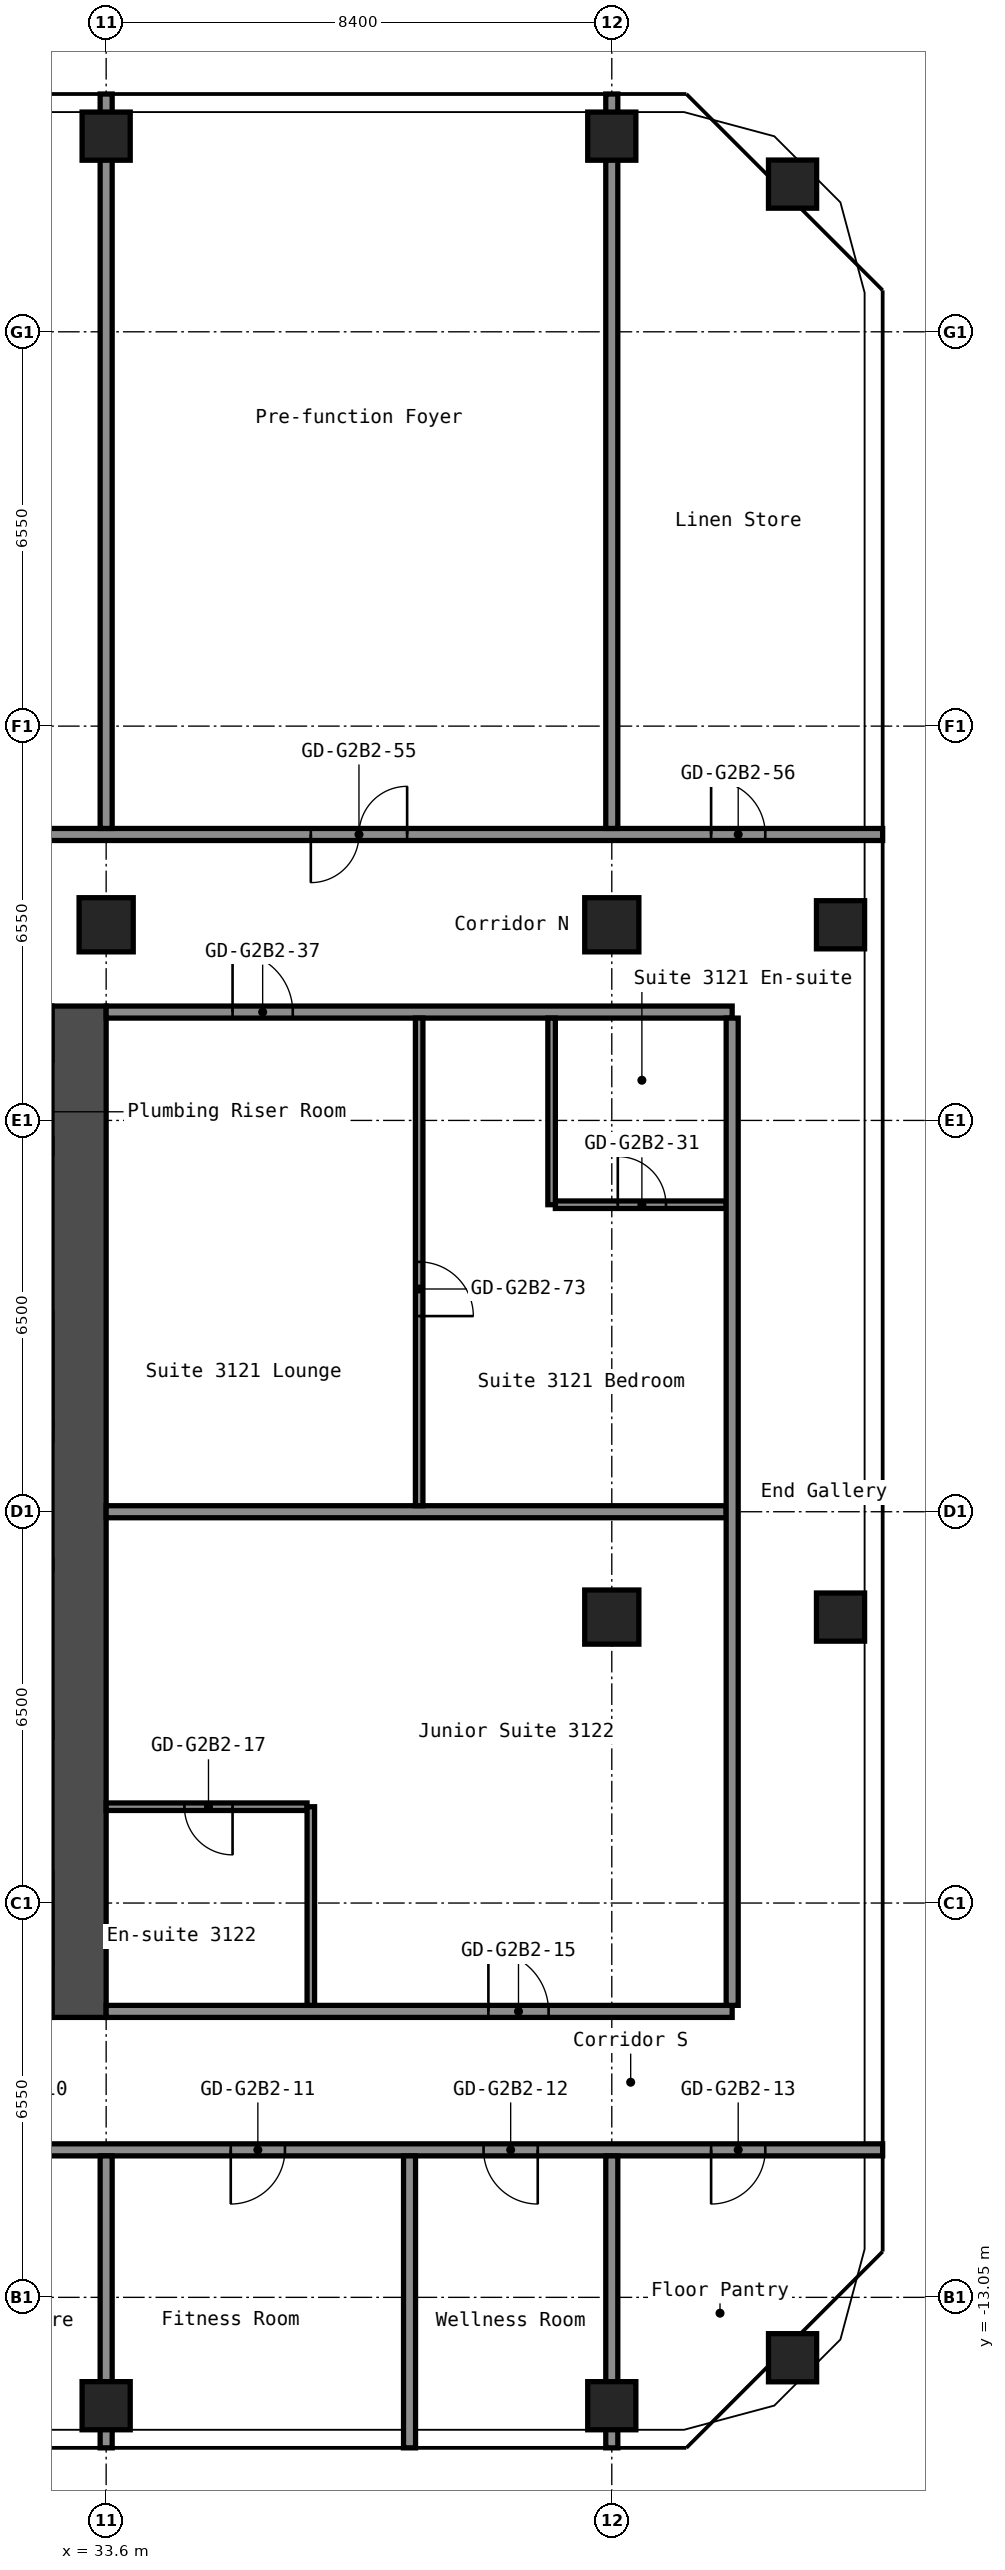
"""IFC4 building model, lengths in metres.
Left out: names, types, materials, properties, quantities, classifications, styles, units other than length and angle.
Written with IfcOpenShell. Run it as: python <this file> out.ifc"""

import sys

from ifc_helpers import new_model, si_unit, direction, frame, frame_2d, origin, origin_2d, place, context, subcontext, project, spatial, rectangle, hollow_rectangle, extrude, element, fill, save


model = new_model("IFC4")
c1 = context("Model", 3, precision=1e-05, world=origin(), true_north=direction((0.0, 1.0)))
c2 = subcontext(c1, "Body", "Model", "MODEL_VIEW")
j1 = project(units=[si_unit("LENGTHUNIT", "METRE"), si_unit("PLANEANGLEUNIT", "RADIAN")], contexts=[c1])
p1 = place(None, origin())
s1 = spatial("IfcSite", under=j1, at=p1, CompositionType="ELEMENT")
p2 = place(p1, origin())
s2 = spatial("IfcBuilding", under=s1, at=p2, CompositionType="ELEMENT")
p3 = place(p2, frame((0.0, 0.0, 110.6)))
s3 = spatial("IfcBuildingStorey", under=s2, at=p3, CompositionType="ELEMENT", Elevation=110.6)
p4 = place(p3, frame((33.6, -14.85, 0.0), z_axis=(0.0, 0.0, 1.0), x_axis=(1.0, 0.0, 0.0)))
e1 = element("IfcColumn", 1, at=p4, inside=s3, PredefinedType="COLUMN", context=c2, shape_type="SweptSolid", body=[
    extrude(hollow_rectangle(XDim=0.8, YDim=0.8, WallThickness=0.032, at=origin_2d()), origin(), (0.0, 0.0, 1.0), 2.8),
])
p5 = place(p3, frame((33.6, 9.75, 0.0), z_axis=(0.0, 0.0, 1.0), x_axis=(1.0, 0.0, 0.0)))
e2 = element("IfcColumn", 2, at=p5, inside=s3, PredefinedType="COLUMN", context=c2, shape_type="SweptSolid", body=[
    extrude(hollow_rectangle(XDim=0.9, YDim=0.9, WallThickness=0.036, at=origin_2d()), origin(), (0.0, 0.0, 1.0), 2.8),
])
for number, where, z_axis, x_axis in (
    (3, (33.6, 22.85, 0.0), (0.0, 0.0, 1.0), (1.0, 0.0, 0.0)),
    (4, (42.0, -14.85, 0.0), (0.0, 0.0, 1.0), (1.0, 0.0, 0.0)),
):
    element("IfcColumn", number, at=place(p3, frame(where, z_axis=z_axis, x_axis=x_axis)), inside=s3, PredefinedType="COLUMN", context=c2, shape_type="SweptSolid", body=[
        extrude(hollow_rectangle(XDim=0.8, YDim=0.8, WallThickness=0.032, at=origin_2d()), origin(), (0.0, 0.0, 1.0), 2.8),
    ])
for number, where, z_axis, x_axis in (
    (5, (42.0, -1.75, 0.0), (0.0, 0.0, 1.0), (1.0, 0.0, 0.0)),
    (6, (42.0, 9.75, 0.0), (0.0, 0.0, 1.0), (1.0, 0.0, 0.0)),
):
    element("IfcColumn", number, at=place(p3, frame(where, z_axis=z_axis, x_axis=x_axis)), inside=s3, PredefinedType="COLUMN", context=c2, shape_type="SweptSolid", body=[
        extrude(hollow_rectangle(XDim=0.9, YDim=0.9, WallThickness=0.036, at=origin_2d()), origin(), (0.0, 0.0, 1.0), 2.8),
    ])
for number, where, z_axis, x_axis in (
    (7, (42.0, 22.85, 0.0), (0.0, 0.0, 1.0), (1.0, 0.0, 0.0)),
    (8, (45.003, -14.053, 0.0), (0.0, 0.0, 1.0), (1.0, 0.0, 0.0)),
    (9, (45.8, -1.75, 0.0), (0.0, 0.0, 1.0), (1.0, 0.0, 0.0)),
    (10, (45.8, 9.75, 0.0), (0.0, 0.0, 1.0), (1.0, 0.0, 0.0)),
    (11, (45.003, 22.053, 0.0), (0.0, 0.0, 1.0), (1.0, 0.0, 0.0)),
):
    element("IfcColumn", number, at=place(p3, frame(where, z_axis=z_axis, x_axis=x_axis)), inside=s3, PredefinedType="COLUMN", context=c2, shape_type="SweptSolid", body=[
        extrude(hollow_rectangle(XDim=0.8, YDim=0.8, WallThickness=0.032, at=origin_2d()), origin(), (0.0, 0.0, 1.0), 2.8),
    ])
p6 = place(p3, frame((33.15, -8.4, 0.0), z_axis=(0.0, 0.0, 1.0), x_axis=(0.0, 1.0, 0.0)))
e12 = element("IfcWall", 12, at=p6, inside=s3, PredefinedType="SHEAR", context=c2, shape_type="SweptSolid", body=[
    extrude(rectangle(XDim=16.8, YDim=0.9, at=frame_2d((8.4, 0.0))), origin(), (0.0, 0.0, 1.0), 2.8),
])
p7 = place(p3, frame((16.8, -10.6, 0.0), z_axis=(0.0, 0.0, 1.0), x_axis=(1.0, 0.0, 0.0)))
e13 = element("IfcWall", 13, at=p7, inside=s3, PredefinedType="PARTITIONING", context=c2, shape_type="SweptSolid", body=[
    extrude(rectangle(XDim=29.7, YDim=0.2, at=frame_2d((14.85, 0.0))), origin(), (0.0, 0.0, 1.0), 2.8),
])
p8 = place(p7, frame((1.23, 0.0, 0.0)))
e14 = element("IfcOpeningElement", 14, at=p8, cuts=e13, PredefinedType="OPENING", context=c2, shape_type="SweptSolid", body=[
    extrude(rectangle(XDim=0.9, YDim=2.1, at=frame_2d((0.45, 1.05))), frame((0.0, 0.11, 0.0), z_axis=(0.0, -1.0, 0.0), x_axis=(1.0, 0.0, 0.0)), (0.0, 0.0, 1.0), 0.22),
])
p9 = place(p7, frame((5.43, 0.0, 0.0)))
e15 = element("IfcOpeningElement", 15, at=p9, cuts=e13, PredefinedType="OPENING", context=c2, shape_type="SweptSolid", body=[
    extrude(rectangle(XDim=0.9, YDim=2.1, at=frame_2d((0.45, 1.05))), frame((0.0, 0.11, 0.0), z_axis=(0.0, -1.0, 0.0), x_axis=(1.0, 0.0, 0.0)), (0.0, 0.0, 1.0), 0.22),
])
p10 = place(p7, frame((10.555, 0.0, 0.0)))
e16 = element("IfcOpeningElement", 16, at=p10, cuts=e13, PredefinedType="OPENING", context=c2, shape_type="SweptSolid", body=[
    extrude(rectangle(XDim=0.9, YDim=2.1, at=frame_2d((0.45, 1.05))), frame((0.0, 0.11, 0.0), z_axis=(0.0, -1.0, 0.0), x_axis=(1.0, 0.0, 0.0)), (0.0, 0.0, 1.0), 0.22),
])
p11 = place(p7, frame((14.755, 0.0, 0.0)))
e17 = element("IfcOpeningElement", 17, at=p11, cuts=e13, PredefinedType="OPENING", context=c2, shape_type="SweptSolid", body=[
    extrude(rectangle(XDim=0.9, YDim=2.1, at=frame_2d((0.45, 1.05))), frame((0.0, 0.11, 0.0), z_axis=(0.0, -1.0, 0.0), x_axis=(1.0, 0.0, 0.0)), (0.0, 0.0, 1.0), 0.22),
])
p12 = place(p7, frame((18.87, 0.0, 0.0)))
e18 = element("IfcOpeningElement", 18, at=p12, cuts=e13, PredefinedType="OPENING", context=c2, shape_type="SweptSolid", body=[
    extrude(rectangle(XDim=0.9, YDim=2.1, at=frame_2d((0.45, 1.05))), frame((0.0, 0.11, 0.0), z_axis=(0.0, -1.0, 0.0), x_axis=(1.0, 0.0, 0.0)), (0.0, 0.0, 1.0), 0.22),
])
p13 = place(p7, frame((23.07, 0.0, 0.0)))
e19 = element("IfcOpeningElement", 19, at=p13, cuts=e13, PredefinedType="OPENING", context=c2, shape_type="SweptSolid", body=[
    extrude(rectangle(XDim=0.9, YDim=2.1, at=frame_2d((0.45, 1.05))), frame((0.0, 0.11, 0.0), z_axis=(0.0, -1.0, 0.0), x_axis=(1.0, 0.0, 0.0)), (0.0, 0.0, 1.0), 0.22),
])
p14 = place(p7, frame((26.85, 0.0, 0.0)))
e20 = element("IfcOpeningElement", 20, at=p14, cuts=e13, PredefinedType="OPENING", context=c2, shape_type="SweptSolid", body=[
    extrude(rectangle(XDim=0.9, YDim=2.1, at=frame_2d((0.45, 1.05))), frame((0.0, 0.11, 0.0), z_axis=(0.0, -1.0, 0.0), x_axis=(1.0, 0.0, 0.0)), (0.0, 0.0, 1.0), 0.22),
])
p15 = place(p3, frame((33.6, -8.3, 0.0), z_axis=(0.0, 0.0, 1.0), x_axis=(1.0, 0.0, 0.0)))
e21 = element("IfcWall", 21, at=p15, inside=s3, PredefinedType="PARTITIONING", context=c2, shape_type="SweptSolid", body=[
    extrude(rectangle(XDim=10.4, YDim=0.2, at=frame_2d((5.2, 0.0))), origin(), (0.0, 0.0, 1.0), 2.8),
])
p16 = place(p15, frame((6.35, 0.0, 0.0)))
e22 = element("IfcOpeningElement", 22, at=p16, cuts=e21, PredefinedType="OPENING", context=c2, shape_type="SweptSolid", body=[
    extrude(rectangle(XDim=1.0, YDim=2.1, at=frame_2d((0.5, 1.05))), frame((0.0, 0.11, 0.0), z_axis=(0.0, -1.0, 0.0), x_axis=(1.0, 0.0, 0.0)), (0.0, 0.0, 1.0), 0.22),
])
p17 = place(p3, frame((33.6, -4.9, 0.0), z_axis=(0.0, 0.0, 1.0), x_axis=(1.0, 0.0, 0.0)))
e23 = element("IfcWall", 23, at=p17, inside=s3, PredefinedType="PARTITIONING", context=c2, shape_type="SweptSolid", body=[
    extrude(rectangle(XDim=3.337, YDim=0.125, at=frame_2d((1.669, 0.0))), origin(), (0.0, 0.0, 1.0), 2.8),
])
p18 = place(p17, frame((1.3, 0.0, 0.0)))
e24 = element("IfcOpeningElement", 24, at=p18, cuts=e23, PredefinedType="OPENING", context=c2, shape_type="SweptSolid", body=[
    extrude(rectangle(XDim=0.8, YDim=2.1, at=frame_2d((0.4, 1.05))), frame((0.0, 0.073, 0.0), z_axis=(0.0, -1.0, 0.0), x_axis=(1.0, 0.0, 0.0)), (0.0, 0.0, 1.0), 0.145),
])
p19 = place(p3, frame((33.6, 0.0, 0.0), z_axis=(0.0, 0.0, 1.0), x_axis=(1.0, 0.0, 0.0)))
e25 = element("IfcWall", 25, at=p19, inside=s3, PredefinedType="PARTITIONING", context=c2, shape_type="SweptSolid", body=[
    extrude(rectangle(XDim=10.3, YDim=0.2, at=frame_2d((5.15, 0.0))), origin(), (0.0, 0.0, 1.0), 2.8),
])
p20 = place(p3, frame((41.062, 5.1, 0.0), z_axis=(0.0, 0.0, 1.0), x_axis=(1.0, 0.0, 0.0)))
e26 = element("IfcWall", 26, at=p20, inside=s3, PredefinedType="PARTITIONING", context=c2, shape_type="SweptSolid", body=[
    extrude(rectangle(XDim=2.837, YDim=0.125, at=frame_2d((1.419, 0.0))), origin(), (0.0, 0.0, 1.0), 2.8),
])
p21 = place(p20, frame((1.038, 0.0, 0.0)))
e27 = element("IfcOpeningElement", 27, at=p21, cuts=e26, PredefinedType="OPENING", context=c2, shape_type="SweptSolid", body=[
    extrude(rectangle(XDim=0.8, YDim=2.1, at=frame_2d((0.4, 1.05))), frame((0.0, 0.073, 0.0), z_axis=(0.0, -1.0, 0.0), x_axis=(1.0, 0.0, 0.0)), (0.0, 0.0, 1.0), 0.145),
])
p22 = place(p3, frame((33.6, 8.3, 0.0), z_axis=(0.0, 0.0, 1.0), x_axis=(1.0, 0.0, 0.0)))
e28 = element("IfcWall", 28, at=p22, inside=s3, PredefinedType="PARTITIONING", context=c2, shape_type="SweptSolid", body=[
    extrude(rectangle(XDim=10.4, YDim=0.2, at=frame_2d((5.2, 0.0))), origin(), (0.0, 0.0, 1.0), 2.8),
])
p23 = place(p22, frame((2.1, 0.0, 0.0)))
e29 = element("IfcOpeningElement", 29, at=p23, cuts=e28, PredefinedType="OPENING", context=c2, shape_type="SweptSolid", body=[
    extrude(rectangle(XDim=1.0, YDim=2.1, at=frame_2d((0.5, 1.05))), frame((0.0, 0.11, 0.0), z_axis=(0.0, -1.0, 0.0), x_axis=(1.0, 0.0, 0.0)), (0.0, 0.0, 1.0), 0.22),
])
p24 = place(p3, frame((16.8, 11.25, 0.0), z_axis=(0.0, 0.0, 1.0), x_axis=(1.0, 0.0, 0.0)))
e30 = element("IfcWall", 30, at=p24, inside=s3, PredefinedType="PARTITIONING", context=c2, shape_type="SweptSolid", body=[
    extrude(rectangle(XDim=29.7, YDim=0.2, at=frame_2d((14.85, 0.0))), origin(), (0.0, 0.0, 1.0), 2.8),
])
p25 = place(p24, frame((3.4, 0.0, 0.0)))
e31 = element("IfcOpeningElement", 31, at=p25, cuts=e30, PredefinedType="OPENING", context=c2, shape_type="SweptSolid", body=[
    extrude(rectangle(XDim=1.6, YDim=2.1, at=frame_2d((0.8, 1.05))), frame((0.0, 0.11, 0.0), z_axis=(0.0, -1.0, 0.0), x_axis=(1.0, 0.0, 0.0)), (0.0, 0.0, 1.0), 0.22),
])
p26 = place(p24, frame((11.8, 0.0, 0.0)))
e32 = element("IfcOpeningElement", 32, at=p26, cuts=e30, PredefinedType="OPENING", context=c2, shape_type="SweptSolid", body=[
    extrude(rectangle(XDim=1.6, YDim=2.1, at=frame_2d((0.8, 1.05))), frame((0.0, 0.11, 0.0), z_axis=(0.0, -1.0, 0.0), x_axis=(1.0, 0.0, 0.0)), (0.0, 0.0, 1.0), 0.22),
])
p27 = place(p24, frame((20.2, 0.0, 0.0)))
e33 = element("IfcOpeningElement", 33, at=p27, cuts=e30, PredefinedType="OPENING", context=c2, shape_type="SweptSolid", body=[
    extrude(rectangle(XDim=1.6, YDim=2.1, at=frame_2d((0.8, 1.05))), frame((0.0, 0.11, 0.0), z_axis=(0.0, -1.0, 0.0), x_axis=(1.0, 0.0, 0.0)), (0.0, 0.0, 1.0), 0.22),
])
p28 = place(p24, frame((26.85, 0.0, 0.0)))
e34 = element("IfcOpeningElement", 34, at=p28, cuts=e30, PredefinedType="OPENING", context=c2, shape_type="SweptSolid", body=[
    extrude(rectangle(XDim=0.9, YDim=2.1, at=frame_2d((0.45, 1.05))), frame((0.0, 0.11, 0.0), z_axis=(0.0, -1.0, 0.0), x_axis=(1.0, 0.0, 0.0)), (0.0, 0.0, 1.0), 0.22),
])
p29 = place(p3, frame((33.6, -15.55, 0.0), z_axis=(0.0, 0.0, 1.0), x_axis=(0.0, 1.0, 0.0)))
e35 = element("IfcWall", 35, at=p29, inside=s3, PredefinedType="PARTITIONING", context=c2, shape_type="SweptSolid", body=[
    extrude(rectangle(XDim=4.85, YDim=0.2, at=frame_2d((2.425, 0.0))), origin(), (0.0, 0.0, 1.0), 2.8),
])
p30 = place(p3, frame((33.6, 11.35, 0.0), z_axis=(0.0, 0.0, 1.0), x_axis=(0.0, 1.0, 0.0)))
e36 = element("IfcWall", 36, at=p30, inside=s3, PredefinedType="PARTITIONING", context=c2, shape_type="SweptSolid", body=[
    extrude(rectangle(XDim=12.2, YDim=0.2, at=frame_2d((6.1, 0.0))), origin(), (0.0, 0.0, 1.0), 2.8),
])
p31 = place(p3, frame((37.0, -8.2, 0.0), z_axis=(0.0, 0.0, 1.0), x_axis=(0.0, 1.0, 0.0)))
e37 = element("IfcWall", 37, at=p31, inside=s3, PredefinedType="PARTITIONING", context=c2, shape_type="SweptSolid", body=[
    extrude(rectangle(XDim=3.3, YDim=0.125, at=frame_2d((1.65, 0.0))), origin(), (0.0, 0.0, 1.0), 2.8),
])
p32 = place(p3, frame((38.64, -15.55, 0.0), z_axis=(0.0, 0.0, 1.0), x_axis=(0.0, 1.0, 0.0)))
e38 = element("IfcWall", 38, at=p32, inside=s3, PredefinedType="PARTITIONING", context=c2, shape_type="SweptSolid", body=[
    extrude(rectangle(XDim=4.85, YDim=0.2, at=frame_2d((2.425, 0.0))), origin(), (0.0, 0.0, 1.0), 2.8),
])
p33 = place(p3, frame((38.8, 0.1, 0.0), z_axis=(0.0, 0.0, 1.0), x_axis=(0.0, 1.0, 0.0)))
e39 = element("IfcWall", 39, at=p33, inside=s3, PredefinedType="PARTITIONING", context=c2, shape_type="SweptSolid", body=[
    extrude(rectangle(XDim=8.1, YDim=0.125, at=frame_2d((4.05, 0.0))), origin(), (0.0, 0.0, 1.0), 2.8),
])
p34 = place(p33, frame((3.15, 0.0, 0.0)))
e40 = element("IfcOpeningElement", 40, at=p34, cuts=e39, PredefinedType="OPENING", context=c2, shape_type="SweptSolid", body=[
    extrude(rectangle(XDim=0.9, YDim=2.1, at=frame_2d((0.45, 1.05))), frame((0.0, 0.073, 0.0), z_axis=(0.0, -1.0, 0.0), x_axis=(1.0, 0.0, 0.0)), (0.0, 0.0, 1.0), 0.145),
])
p35 = place(p3, frame((41.0, 5.1, 0.0), z_axis=(0.0, 0.0, 1.0), x_axis=(0.0, 1.0, 0.0)))
e41 = element("IfcWall", 41, at=p35, inside=s3, PredefinedType="PARTITIONING", context=c2, shape_type="SweptSolid", body=[
    extrude(rectangle(XDim=3.1, YDim=0.125, at=frame_2d((1.55, 0.0))), origin(), (0.0, 0.0, 1.0), 2.8),
])
p36 = place(p3, frame((42.0, -15.55, 0.0), z_axis=(0.0, 0.0, 1.0), x_axis=(0.0, 1.0, 0.0)))
e42 = element("IfcWall", 42, at=p36, inside=s3, PredefinedType="PARTITIONING", context=c2, shape_type="SweptSolid", body=[
    extrude(rectangle(XDim=4.85, YDim=0.2, at=frame_2d((2.425, 0.0))), origin(), (0.0, 0.0, 1.0), 2.8),
])
p37 = place(p3, frame((42.0, 11.35, 0.0), z_axis=(0.0, 0.0, 1.0), x_axis=(0.0, 1.0, 0.0)))
e43 = element("IfcWall", 43, at=p37, inside=s3, PredefinedType="PARTITIONING", context=c2, shape_type="SweptSolid", body=[
    extrude(rectangle(XDim=12.2, YDim=0.2, at=frame_2d((6.1, 0.0))), origin(), (0.0, 0.0, 1.0), 2.8),
])
p38 = place(p3, frame((44.0, -8.2, 0.0), z_axis=(0.0, 0.0, 1.0), x_axis=(0.0, 1.0, 0.0)))
e44 = element("IfcWall", 44, at=p38, inside=s3, PredefinedType="PARTITIONING", context=c2, shape_type="SweptSolid", body=[
    extrude(rectangle(XDim=16.4, YDim=0.2, at=frame_2d((8.2, 0.0))), origin(), (0.0, 0.0, 1.0), 2.8),
])
p39 = place(p12, origin())
e45 = element("IfcDoor", 45, at=p39, inside=s3, OperationType="SINGLE_SWING_LEFT", PredefinedType="DOOR", context=c2, shape_type="SweptSolid", body=[
    extrude(rectangle(XDim=0.9, YDim=2.1, at=frame_2d((0.45, 1.05))), frame((0.0, 0.025, 0.0), z_axis=(0.0, -1.0, 0.0), x_axis=(1.0, 0.0, 0.0)), (0.0, 0.0, 1.0), 0.05),
])
fill(e18, e45)
p40 = place(p13, origin())
e46 = element("IfcDoor", 46, at=p40, inside=s3, OperationType="SINGLE_SWING_RIGHT", PredefinedType="DOOR", context=c2, shape_type="SweptSolid", body=[
    extrude(rectangle(XDim=0.9, YDim=2.1, at=frame_2d((0.45, 1.05))), frame((0.0, 0.025, 0.0), z_axis=(0.0, -1.0, 0.0), x_axis=(1.0, 0.0, 0.0)), (0.0, 0.0, 1.0), 0.05),
])
fill(e19, e46)
p41 = place(p14, origin())
e47 = element("IfcDoor", 47, at=p41, inside=s3, OperationType="SINGLE_SWING_LEFT", PredefinedType="DOOR", context=c2, shape_type="SweptSolid", body=[
    extrude(rectangle(XDim=0.9, YDim=2.1, at=frame_2d((0.45, 1.05))), frame((0.0, 0.025, 0.0), z_axis=(0.0, -1.0, 0.0), x_axis=(1.0, 0.0, 0.0)), (0.0, 0.0, 1.0), 0.05),
])
fill(e20, e47)
p42 = place(p16, origin())
e48 = element("IfcDoor", 48, at=p42, inside=s3, OperationType="SINGLE_SWING_RIGHT", PredefinedType="DOOR", context=c2, shape_type="SweptSolid", body=[
    extrude(rectangle(XDim=1.0, YDim=2.1, at=frame_2d((0.5, 1.05))), frame((0.0, 0.025, 0.0), z_axis=(0.0, -1.0, 0.0), x_axis=(1.0, 0.0, 0.0)), (0.0, 0.0, 1.0), 0.05),
])
fill(e22, e48)
p43 = place(p18, origin())
e49 = element("IfcDoor", 49, at=p43, inside=s3, OperationType="SINGLE_SWING_RIGHT", PredefinedType="DOOR", context=c2, shape_type="SweptSolid", body=[
    extrude(rectangle(XDim=0.8, YDim=2.1, at=frame_2d((0.4, 1.05))), frame((0.0, 0.025, 0.0), z_axis=(0.0, -1.0, 0.0), x_axis=(1.0, 0.0, 0.0)), (0.0, 0.0, 1.0), 0.05),
])
fill(e24, e49)
p44 = place(p21, origin())
e50 = element("IfcDoor", 50, at=p44, inside=s3, OperationType="SINGLE_SWING_RIGHT", PredefinedType="DOOR", context=c2, shape_type="SweptSolid", body=[
    extrude(rectangle(XDim=0.8, YDim=2.1, at=frame_2d((0.4, 1.05))), frame((0.0, 0.025, 0.0), z_axis=(0.0, -1.0, 0.0), x_axis=(1.0, 0.0, 0.0)), (0.0, 0.0, 1.0), 0.05),
])
fill(e27, e50)
p45 = place(p23, origin())
e51 = element("IfcDoor", 51, at=p45, inside=s3, OperationType="SINGLE_SWING_RIGHT", PredefinedType="DOOR", context=c2, shape_type="SweptSolid", body=[
    extrude(rectangle(XDim=1.0, YDim=2.1, at=frame_2d((0.5, 1.05))), frame((0.0, 0.025, 0.0), z_axis=(0.0, -1.0, 0.0), x_axis=(1.0, 0.0, 0.0)), (0.0, 0.0, 1.0), 0.05),
])
fill(e29, e51)
p46 = place(p27, origin())
e52 = element("IfcDoor", 52, at=p46, inside=s3, OperationType="DOUBLE_DOOR_SINGLE_SWING", PredefinedType="DOOR", context=c2, shape_type="SweptSolid", body=[
    extrude(rectangle(XDim=1.6, YDim=2.1, at=frame_2d((0.8, 1.05))), frame((0.0, 0.025, 0.0), z_axis=(0.0, -1.0, 0.0), x_axis=(1.0, 0.0, 0.0)), (0.0, 0.0, 1.0), 0.05),
])
fill(e33, e52)
p47 = place(p28, origin())
e53 = element("IfcDoor", 53, at=p47, inside=s3, OperationType="SINGLE_SWING_RIGHT", PredefinedType="DOOR", context=c2, shape_type="SweptSolid", body=[
    extrude(rectangle(XDim=0.9, YDim=2.1, at=frame_2d((0.45, 1.05))), frame((0.0, 0.025, 0.0), z_axis=(0.0, -1.0, 0.0), x_axis=(1.0, 0.0, 0.0)), (0.0, 0.0, 1.0), 0.05),
])
fill(e34, e53)
p48 = place(p34, origin())
e54 = element("IfcDoor", 54, at=p48, inside=s3, OperationType="SINGLE_SWING_LEFT", PredefinedType="DOOR", context=c2, shape_type="SweptSolid", body=[
    extrude(rectangle(XDim=0.9, YDim=2.1, at=frame_2d((0.45, 1.05))), frame((0.0, 0.025, 0.0), z_axis=(0.0, -1.0, 0.0), x_axis=(1.0, 0.0, 0.0)), (0.0, 0.0, 1.0), 0.05),
])
fill(e40, e54)
save(model, sys.argv[1])
